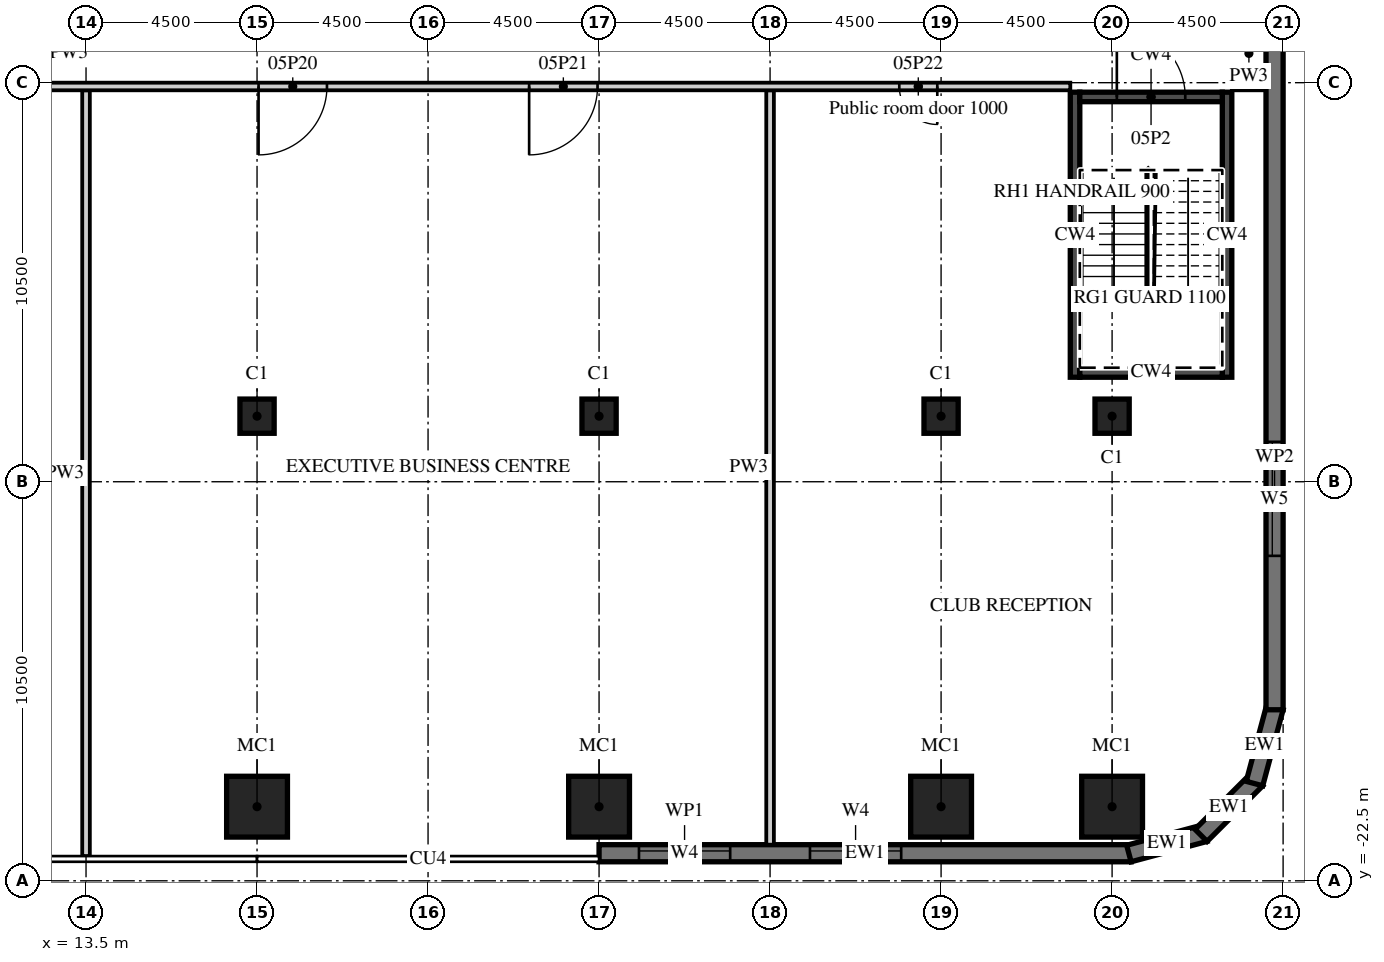
"""IFC4 building model, lengths in metres.
Left out: names, types, materials, properties, quantities, classifications, styles, units other than length and angle.
Written with IfcOpenShell. Run it as: python <this file> out.ifc"""

import sys

from ifc_helpers import new_model, si_unit, direction, frame, frame_2d, origin, origin_2d, place, context, subcontext, project, spatial, polyline, rectangle, outline, extrude, element, fill, save


model = new_model("IFC4")
c1 = context("Model", 3, precision=1e-05, world=origin(), true_north=direction((0.0, 1.0)))
c2 = subcontext(c1, "Body", "Model", "MODEL_VIEW")
j1 = project(units=[si_unit("LENGTHUNIT", "METRE"), si_unit("PLANEANGLEUNIT", "RADIAN")], contexts=[c1])
p1 = place(None, origin())
s1 = spatial("IfcSite", under=j1, at=p1, CompositionType="ELEMENT")
p2 = place(p1, origin())
s2 = spatial("IfcBuilding", under=s1, at=p2, CompositionType="ELEMENT")
p3 = place(p2, frame((0.0, 0.0, 33.5)))
s3 = spatial("IfcBuildingStorey", under=s2, at=p3, CompositionType="ELEMENT", Elevation=33.5)
for number, where, z_axis, x_axis in (
    (1, (18.0, -20.55, 0.0), (0.0, 0.0, 1.0), (1.0, 0.0, 0.0)),
    (2, (27.0, -20.55, 0.0), (0.0, 0.0, 1.0), (1.0, 0.0, 0.0)),
    (3, (36.0, -20.55, 0.0), (0.0, 0.0, 1.0), (1.0, 0.0, 0.0)),
    (4, (40.5, -20.55, 0.0), (0.0, 0.0, 1.0), (1.0, 0.0, 0.0)),
):
    element("IfcColumn", number, at=place(p3, frame(where, z_axis=z_axis, x_axis=x_axis)), inside=s3, PredefinedType="COLUMN", context=c2, shape_type="SweptSolid", body=[
        extrude(rectangle(XDim=1.6, YDim=1.6, at=origin_2d()), origin(), (0.0, 0.0, 1.0), 4.5),
    ])
for number, where, z_axis, x_axis in (
    (5, (18.0, -10.275, 0.0), (0.0, 0.0, 1.0), (1.0, 0.0, 0.0)),
    (6, (27.0, -10.275, 0.0), (0.0, 0.0, 1.0), (1.0, 0.0, 0.0)),
    (7, (36.0, -10.275, 0.0), (0.0, 0.0, 1.0), (1.0, 0.0, 0.0)),
    (8, (40.5, -10.275, 0.0), (0.0, 0.0, 1.0), (1.0, 0.0, 0.0)),
):
    element("IfcColumn", number, at=place(p3, frame(where, z_axis=z_axis, x_axis=x_axis)), inside=s3, PredefinedType="COLUMN", context=c2, shape_type="SweptSolid", body=[
        extrude(rectangle(XDim=0.9, YDim=0.9, at=origin_2d()), origin(), (0.0, 0.0, 1.0), 4.5),
    ])
p4 = place(p3, frame((27.0, -21.775, 0.0), z_axis=(0.0, 0.0, 1.0), x_axis=(1.0, 0.0, 0.0)))
e9 = element("IfcWall", 9, at=p4, inside=s3, PredefinedType="SOLIDWALL", context=c2, shape_type="SweptSolid", body=[
    extrude(rectangle(XDim=14.0, YDim=0.45, at=frame_2d((7.0, 0.0))), origin(), (0.0, 0.0, 1.0), 4.05),
])
p5 = place(p4, frame((1.05, 0.0, 0.9)))
e10 = element("IfcOpeningElement", 10, at=p5, cuts=e9, PredefinedType="OPENING", context=c2, shape_type="SweptSolid", body=[
    extrude(rectangle(XDim=2.4, YDim=1.8, at=frame_2d((1.2, 0.9))), frame((0.0, 0.235, 0.0), z_axis=(0.0, -1.0, 0.0), x_axis=(1.0, 0.0, 0.0)), (0.0, 0.0, 1.0), 0.47),
])
p6 = place(p4, frame((5.55, 0.0, 0.9)))
e11 = element("IfcOpeningElement", 11, at=p6, cuts=e9, PredefinedType="OPENING", context=c2, shape_type="SweptSolid", body=[
    extrude(rectangle(XDim=2.4, YDim=1.8, at=frame_2d((1.2, 0.9))), frame((0.0, 0.235, 0.0), z_axis=(0.0, -1.0, 0.0), x_axis=(1.0, 0.0, 0.0)), (0.0, 0.0, 1.0), 0.47),
])
p7 = place(p3, frame((40.942, -21.783, 0.0), z_axis=(0.0, 0.0, 1.0), x_axis=(0.965926999034, 0.25881466832, 0.0)))
e12 = element("IfcWall", 12, at=p7, inside=s3, PredefinedType="SOLIDWALL", context=c2, shape_type="SweptSolid", body=[
    extrude(outline(polyline([(0.0, -0.225), (2.071, -0.225), (1.95, 0.225), (0.121, 0.225), (0.0, -0.225)])), origin(), (0.0, 0.0, 1.0), 4.05),
])
p8 = place(p3, frame((42.841, -21.305, 0.0), z_axis=(0.0, 0.0, 1.0), x_axis=(0.707106781187, 0.707106781187, 0.0)))
e13 = element("IfcWall", 13, at=p8, inside=s3, PredefinedType="SOLIDWALL", context=c2, shape_type="SweptSolid", body=[
    extrude(outline(polyline([(0.0, -0.225), (2.071, -0.225), (1.95, 0.225), (0.121, 0.225), (0.0, -0.225)])), origin(), (0.0, 0.0, 1.0), 4.05),
])
p9 = place(p3, frame((44.247, -19.942, 0.0), z_axis=(0.0, 0.0, 1.0), x_axis=(0.25881466832, 0.965926999034, 0.0)))
e14 = element("IfcWall", 14, at=p9, inside=s3, PredefinedType="SOLIDWALL", context=c2, shape_type="SweptSolid", body=[
    extrude(outline(polyline([(-0.0, -0.225), (2.07, -0.225), (1.95, 0.225), (0.12, 0.225), (-0.0, -0.225)])), origin(), (0.0, 0.0, 1.0), 4.05),
])
p10 = place(p3, frame((44.775, -18.0, 0.0), z_axis=(0.0, 0.0, 1.0), x_axis=(0.0, 1.0, 0.0)))
e15 = element("IfcWall", 15, at=p10, inside=s3, PredefinedType="SOLIDWALL", context=c2, shape_type="SweptSolid", body=[
    extrude(rectangle(XDim=36.0, YDim=0.45, at=frame_2d((18.0, 0.0))), origin(), (0.0, 0.0, 1.0), 4.05),
])
p11 = place(p10, frame((4.05, 0.0, 0.9)))
e16 = element("IfcOpeningElement", 16, at=p11, cuts=e15, PredefinedType="OPENING", context=c2, shape_type="SweptSolid", body=[
    extrude(rectangle(XDim=3.0, YDim=1.8, at=frame_2d((1.5, 0.9))), frame((0.0, 0.235, 0.0), z_axis=(0.0, -1.0, 0.0), x_axis=(1.0, 0.0, 0.0)), (0.0, 0.0, 1.0), 0.47),
])
for number, where, z_axis, x_axis in (
    (17, (39.525, -9.25, 0.0), (0.0, 0.0, 1.0), (0.0, 1.0, 0.0)),
    (18, (43.525, -9.25, 0.0), (0.0, 0.0, 1.0), (0.0, 1.0, 0.0)),
):
    element("IfcWall", number, at=place(p3, frame(where, z_axis=z_axis, x_axis=x_axis)), inside=s3, PredefinedType="SHEAR", context=c2, shape_type="SweptSolid", body=[
        extrude(rectangle(XDim=7.5, YDim=0.25, at=frame_2d((3.75, 0.0))), origin(), (0.0, 0.0, 1.0), 4.05),
    ])
p12 = place(p3, frame((39.65, -9.125, 0.0), z_axis=(0.0, 0.0, 1.0), x_axis=(1.0, 0.0, 0.0)))
e19 = element("IfcWall", 19, at=p12, inside=s3, PredefinedType="SHEAR", context=c2, shape_type="SweptSolid", body=[
    extrude(rectangle(XDim=3.75, YDim=0.25, at=frame_2d((1.875, 0.0))), origin(), (0.0, 0.0, 1.0), 4.05),
])
p13 = place(p3, frame((39.65, -1.875, 0.0), z_axis=(0.0, 0.0, 1.0), x_axis=(1.0, 0.0, 0.0)))
e20 = element("IfcWall", 20, at=p13, inside=s3, PredefinedType="SHEAR", context=c2, shape_type="SweptSolid", body=[
    extrude(rectangle(XDim=3.75, YDim=0.25, at=frame_2d((1.875, 0.0))), origin(), (0.0, 0.0, 1.0), 4.05),
])
p14 = place(p13, frame((0.975, 0.0, 0.0)))
e21 = element("IfcOpeningElement", 21, at=p14, cuts=e20, PredefinedType="OPENING", context=c2, shape_type="SweptSolid", body=[
    extrude(rectangle(XDim=1.8, YDim=2.1, at=frame_2d((0.9, 1.05))), frame((0.0, 0.135, 0.0), z_axis=(0.0, -1.0, 0.0), x_axis=(1.0, 0.0, 0.0)), (0.0, 0.0, 1.0), 0.27),
])
p15 = place(p3, frame((13.5, -21.85, 0.0), z_axis=(0.0, 0.0, 1.0), x_axis=(0.0, 1.0, 0.0)))
e22 = element("IfcWall", 22, at=p15, inside=s3, PredefinedType="PARTITIONING", context=c2, shape_type="SweptSolid", body=[
    extrude(rectangle(XDim=20.15, YDim=0.2, at=frame_2d((10.075, 0.0))), origin(), (0.0, 0.0, 1.0), 4.05),
])
p16 = place(p3, frame((31.5, -21.55, 0.0), z_axis=(0.0, 0.0, 1.0), x_axis=(0.0, 1.0, 0.0)))
e23 = element("IfcWall", 23, at=p16, inside=s3, PredefinedType="PARTITIONING", context=c2, shape_type="SweptSolid", body=[
    extrude(rectangle(XDim=19.85, YDim=0.2, at=frame_2d((9.925, 0.0))), origin(), (0.0, 0.0, 1.0), 4.05),
])
p17 = place(p3, frame((-13.3, -1.6, 0.0), z_axis=(0.0, 0.0, 1.0), x_axis=(1.0, 0.0, 0.0)))
e24 = element("IfcWall", 24, at=p17, inside=s3, PredefinedType="PARTITIONING", context=c2, shape_type="SweptSolid", body=[
    extrude(rectangle(XDim=52.7, YDim=0.2, at=frame_2d((26.35, 0.0))), origin(), (0.0, 0.0, 1.0), 4.05),
])
p18 = place(p17, frame((1.2, 0.0, 0.0)))
e25 = element("IfcOpeningElement", 25, at=p18, cuts=e24, PredefinedType="OPENING", context=c2, shape_type="SweptSolid", body=[
    extrude(rectangle(XDim=1.2, YDim=2.1, at=frame_2d((0.6, 1.05))), frame((0.0, 0.11, 0.0), z_axis=(0.0, -1.0, 0.0), x_axis=(1.0, 0.0, 0.0)), (0.0, 0.0, 1.0), 0.22),
])
p19 = place(p17, frame((12.4, 0.0, 0.0)))
e26 = element("IfcOpeningElement", 26, at=p19, cuts=e24, PredefinedType="OPENING", context=c2, shape_type="SweptSolid", body=[
    extrude(rectangle(XDim=1.8, YDim=2.1, at=frame_2d((0.9, 1.05))), frame((0.0, 0.11, 0.0), z_axis=(0.0, -1.0, 0.0), x_axis=(1.0, 0.0, 0.0)), (0.0, 0.0, 1.0), 0.22),
])
p20 = place(p17, frame((21.4, 0.0, 0.0)))
e27 = element("IfcOpeningElement", 27, at=p20, cuts=e24, PredefinedType="OPENING", context=c2, shape_type="SweptSolid", body=[
    extrude(rectangle(XDim=1.8, YDim=2.1, at=frame_2d((0.9, 1.05))), frame((0.0, 0.11, 0.0), z_axis=(0.0, -1.0, 0.0), x_axis=(1.0, 0.0, 0.0)), (0.0, 0.0, 1.0), 0.22),
])
p21 = place(p17, frame((31.34, 0.0, 0.0)))
e28 = element("IfcOpeningElement", 28, at=p21, cuts=e24, PredefinedType="OPENING", context=c2, shape_type="SweptSolid", body=[
    extrude(rectangle(XDim=1.8, YDim=2.1, at=frame_2d((0.9, 1.05))), frame((0.0, 0.11, 0.0), z_axis=(0.0, -1.0, 0.0), x_axis=(1.0, 0.0, 0.0)), (0.0, 0.0, 1.0), 0.22),
])
p22 = place(p17, frame((38.46, 0.0, 0.0)))
e29 = element("IfcOpeningElement", 29, at=p22, cuts=e24, PredefinedType="OPENING", context=c2, shape_type="SweptSolid", body=[
    extrude(rectangle(XDim=1.8, YDim=2.1, at=frame_2d((0.9, 1.05))), frame((0.0, 0.11, 0.0), z_axis=(0.0, -1.0, 0.0), x_axis=(1.0, 0.0, 0.0)), (0.0, 0.0, 1.0), 0.22),
])
p23 = place(p17, frame((48.2, 0.0, 0.0)))
e30 = element("IfcOpeningElement", 30, at=p23, cuts=e24, PredefinedType="OPENING", context=c2, shape_type="SweptSolid", body=[
    extrude(rectangle(XDim=1.0, YDim=2.1, at=frame_2d((0.5, 1.05))), frame((0.0, 0.11, 0.0), z_axis=(0.0, -1.0, 0.0), x_axis=(1.0, 0.0, 0.0)), (0.0, 0.0, 1.0), 0.22),
])
p24 = place(p3, frame((43.65, -1.6, 0.0), z_axis=(0.0, 0.0, 1.0), x_axis=(1.0, 0.0, 0.0)))
e31 = element("IfcWall", 31, at=p24, inside=s3, PredefinedType="PARTITIONING", context=c2, shape_type="SweptSolid", body=[
    extrude(rectangle(XDim=0.9, YDim=0.2, at=frame_2d((0.45, 0.0))), origin(), (0.0, 0.0, 1.0), 4.05),
])
p25 = place(p5, origin())
e32 = element("IfcWindow", 32, at=p25, inside=s3, PartitioningType="SINGLE_PANEL", PredefinedType="WINDOW", context=c2, shape_type="SweptSolid", body=[
    extrude(rectangle(XDim=2.4, YDim=1.8, at=frame_2d((1.2, 0.9))), frame((0.0, 0.09, 0.0), z_axis=(0.0, -1.0, 0.0), x_axis=(1.0, 0.0, 0.0)), (0.0, 0.0, 1.0), 0.06),
])
fill(e10, e32)
p26 = place(p6, origin())
e33 = element("IfcWindow", 33, at=p26, inside=s3, PartitioningType="SINGLE_PANEL", PredefinedType="WINDOW", context=c2, shape_type="SweptSolid", body=[
    extrude(rectangle(XDim=2.4, YDim=1.8, at=frame_2d((1.2, 0.9))), frame((0.0, 0.09, 0.0), z_axis=(0.0, -1.0, 0.0), x_axis=(1.0, 0.0, 0.0)), (0.0, 0.0, 1.0), 0.06),
])
fill(e11, e33)
p27 = place(p11, origin())
e34 = element("IfcWindow", 34, at=p27, inside=s3, PartitioningType="SINGLE_PANEL", PredefinedType="WINDOW", context=c2, shape_type="SweptSolid", body=[
    extrude(rectangle(XDim=3.0, YDim=1.8, at=frame_2d((1.5, 0.9))), frame((0.0, 0.09, 0.0), z_axis=(0.0, -1.0, 0.0), x_axis=(1.0, 0.0, 0.0)), (0.0, 0.0, 1.0), 0.06),
])
fill(e16, e34)
p28 = place(p14, origin())
e35 = element("IfcDoor", 35, at=p28, inside=s3, OperationType="DOUBLE_DOOR_DOUBLE_SWING", PredefinedType="DOOR", context=c2, shape_type="SweptSolid", body=[
    extrude(rectangle(XDim=1.8, YDim=2.1, at=frame_2d((0.9, 1.05))), frame((0.0, 0.025, 0.0), z_axis=(0.0, -1.0, 0.0), x_axis=(1.0, 0.0, 0.0)), (0.0, 0.0, 1.0), 0.05),
])
fill(e21, e35)
p29 = place(p21, origin())
e36 = element("IfcDoor", 36, at=p29, inside=s3, OperationType="DOUBLE_DOOR_DOUBLE_SWING", PredefinedType="DOOR", context=c2, shape_type="SweptSolid", body=[
    extrude(rectangle(XDim=1.8, YDim=2.1, at=frame_2d((0.9, 1.05))), frame((0.0, 0.025, 0.0), z_axis=(0.0, -1.0, 0.0), x_axis=(1.0, 0.0, 0.0)), (0.0, 0.0, 1.0), 0.05),
])
fill(e28, e36)
p30 = place(p22, origin())
e37 = element("IfcDoor", 37, at=p30, inside=s3, OperationType="DOUBLE_DOOR_DOUBLE_SWING", PredefinedType="DOOR", context=c2, shape_type="SweptSolid", body=[
    extrude(rectangle(XDim=1.8, YDim=2.1, at=frame_2d((0.9, 1.05))), frame((0.0, 0.025, 0.0), z_axis=(0.0, -1.0, 0.0), x_axis=(1.0, 0.0, 0.0)), (0.0, 0.0, 1.0), 0.05),
])
fill(e29, e37)
p31 = place(p23, origin())
e38 = element("IfcDoor", 38, at=p31, inside=s3, OperationType="SINGLE_SWING_RIGHT", PredefinedType="DOOR", context=c2, shape_type="SweptSolid", body=[
    extrude(rectangle(XDim=1.0, YDim=2.1, at=frame_2d((0.5, 1.05))), frame((0.0, 0.025, 0.0), z_axis=(0.0, -1.0, 0.0), x_axis=(1.0, 0.0, 0.0)), (0.0, 0.0, 1.0), 0.05),
])
fill(e30, e38)
save(model, sys.argv[1])
